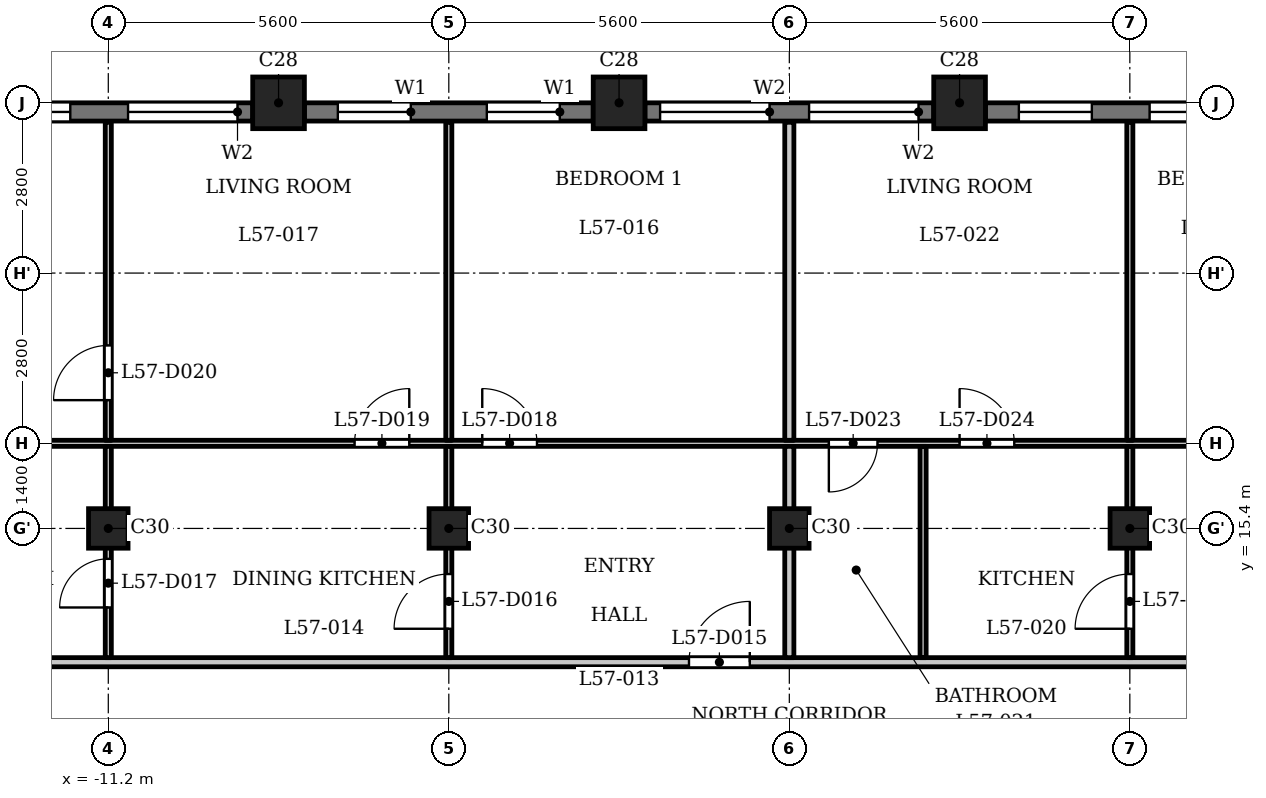
"""IFC4 building model, lengths in metres.
Left out: names, types, materials, properties, quantities, classifications, styles, units other than length and angle.
Written with IfcOpenShell. Run it as: python <this file> out.ifc"""

import sys

from ifc_helpers import new_model, si_unit, direction, frame, frame_2d, origin, origin_2d, place, context, subcontext, project, spatial, rectangle, extrude, element, fill, save


model = new_model("IFC4")
c1 = context("Model", 3, precision=1e-05, world=origin(), true_north=direction((0.0, 1.0)))
c2 = subcontext(c1, "Body", "Model", "MODEL_VIEW")
j1 = project(units=[si_unit("LENGTHUNIT", "METRE"), si_unit("PLANEANGLEUNIT", "RADIAN")], contexts=[c1])
p1 = place(None, origin())
s1 = spatial("IfcSite", under=j1, at=p1, CompositionType="ELEMENT")
p2 = place(p1, origin())
s2 = spatial("IfcBuilding", under=s1, at=p2, CompositionType="ELEMENT")
p3 = place(p2, frame((0.0, 0.0, 220.4)))
s3 = spatial("IfcBuildingStorey", under=s2, at=p3, CompositionType="ELEMENT", Elevation=220.4)
for number, where, z_axis, x_axis in (
    (1, (2.8, 22.4, 0.0), (0.0, 0.0, 1.0), (1.0, 0.0, 0.0)),
    (2, (-2.8, 22.4, 0.0), (0.0, 0.0, 1.0), (1.0, 0.0, 0.0)),
    (3, (-8.4, 22.4, 0.0), (0.0, 0.0, 1.0), (1.0, 0.0, 0.0)),
):
    element("IfcColumn", number, at=place(p3, frame(where, z_axis=z_axis, x_axis=x_axis)), inside=s3, PredefinedType="COLUMN", context=c2, shape_type="SweptSolid", body=[
        extrude(rectangle(XDim=0.85, YDim=0.85, at=origin_2d()), origin(), (0.0, 0.0, 1.0), 3.5),
    ])
for number, where, z_axis, x_axis in (
    (4, (-11.2, 15.4, 0.0), (0.0, 0.0, 1.0), (1.0, 0.0, 0.0)),
    (5, (-5.6, 15.4, 0.0), (0.0, 0.0, 1.0), (1.0, 0.0, 0.0)),
    (6, (0.0, 15.4, 0.0), (0.0, 0.0, 1.0), (1.0, 0.0, 0.0)),
    (7, (5.6, 15.4, 0.0), (0.0, 0.0, 1.0), (1.0, 0.0, 0.0)),
):
    element("IfcColumn", number, at=place(p3, frame(where, z_axis=z_axis, x_axis=x_axis)), inside=s3, PredefinedType="COLUMN", context=c2, shape_type="SweptSolid", body=[
        extrude(rectangle(XDim=0.65, YDim=0.65, at=origin_2d()), origin(), (0.0, 0.0, 1.0), 3.5),
    ])
p4 = place(p3, frame((7.975, 22.25, 0.0), z_axis=(0.0, 0.0, 1.0), x_axis=(-1.0, 0.0, 0.0)))
e8 = element("IfcWall", 8, at=p4, inside=s3, PredefinedType="SOLIDWALL", context=c2, shape_type="SweptSolid", body=[
    extrude(rectangle(XDim=4.75, YDim=0.3, at=frame_2d((2.375, 0.0))), origin(), (0.0, 0.0, 1.0), 2.5),
])
p5 = place(p4, frame((0.25, 0.0, 0.9)))
e9 = element("IfcOpeningElement", 9, at=p5, cuts=e8, PredefinedType="OPENING", context=c2, shape_type="SweptSolid", body=[
    extrude(rectangle(XDim=1.8, YDim=1.25, at=frame_2d((0.9, 0.625))), frame((0.0, 0.16, 0.0), z_axis=(0.0, -1.0, 0.0), x_axis=(1.0, 0.0, 0.0)), (0.0, 0.0, 1.0), 0.32),
])
p6 = place(p4, frame((3.0, 0.0, 0.6)))
e10 = element("IfcOpeningElement", 10, at=p6, cuts=e8, PredefinedType="OPENING", context=c2, shape_type="SweptSolid", body=[
    extrude(rectangle(XDim=1.2, YDim=1.55, at=frame_2d((0.6, 0.775))), frame((0.0, 0.16, 0.0), z_axis=(0.0, -1.0, 0.0), x_axis=(1.0, 0.0, 0.0)), (0.0, 0.0, 1.0), 0.32),
])
p7 = place(p3, frame((2.375, 22.25, 0.0), z_axis=(0.0, 0.0, 1.0), x_axis=(-1.0, 0.0, 0.0)))
e11 = element("IfcWall", 11, at=p7, inside=s3, PredefinedType="SOLIDWALL", context=c2, shape_type="SweptSolid", body=[
    extrude(rectangle(XDim=4.75, YDim=0.3, at=frame_2d((2.375, 0.0))), origin(), (0.0, 0.0, 1.0), 2.5),
])
p8 = place(p7, frame((0.25, 0.0, 0.9)))
e12 = element("IfcOpeningElement", 12, at=p8, cuts=e11, PredefinedType="OPENING", context=c2, shape_type="SweptSolid", body=[
    extrude(rectangle(XDim=1.8, YDim=1.25, at=frame_2d((0.9, 0.625))), frame((0.0, 0.16, 0.0), z_axis=(0.0, -1.0, 0.0), x_axis=(1.0, 0.0, 0.0)), (0.0, 0.0, 1.0), 0.32),
])
p9 = place(p7, frame((2.7, 0.0, 0.9)))
e13 = element("IfcOpeningElement", 13, at=p9, cuts=e11, PredefinedType="OPENING", context=c2, shape_type="SweptSolid", body=[
    extrude(rectangle(XDim=1.8, YDim=1.25, at=frame_2d((0.9, 0.625))), frame((0.0, 0.16, 0.0), z_axis=(0.0, -1.0, 0.0), x_axis=(1.0, 0.0, 0.0)), (0.0, 0.0, 1.0), 0.32),
])
p10 = place(p3, frame((-3.225, 22.25, 0.0), z_axis=(0.0, 0.0, 1.0), x_axis=(-1.0, 0.0, 0.0)))
e14 = element("IfcWall", 14, at=p10, inside=s3, PredefinedType="SOLIDWALL", context=c2, shape_type="SweptSolid", body=[
    extrude(rectangle(XDim=4.75, YDim=0.3, at=frame_2d((2.375, 0.0))), origin(), (0.0, 0.0, 1.0), 2.5),
])
p11 = place(p10, frame((0.55, 0.0, 0.6)))
e15 = element("IfcOpeningElement", 15, at=p11, cuts=e14, PredefinedType="OPENING", context=c2, shape_type="SweptSolid", body=[
    extrude(rectangle(XDim=1.2, YDim=1.55, at=frame_2d((0.6, 0.775))), frame((0.0, 0.16, 0.0), z_axis=(0.0, -1.0, 0.0), x_axis=(1.0, 0.0, 0.0)), (0.0, 0.0, 1.0), 0.32),
])
p12 = place(p10, frame((3.0, 0.0, 0.6)))
e16 = element("IfcOpeningElement", 16, at=p12, cuts=e14, PredefinedType="OPENING", context=c2, shape_type="SweptSolid", body=[
    extrude(rectangle(XDim=1.2, YDim=1.55, at=frame_2d((0.6, 0.775))), frame((0.0, 0.16, 0.0), z_axis=(0.0, -1.0, 0.0), x_axis=(1.0, 0.0, 0.0)), (0.0, 0.0, 1.0), 0.32),
])
p13 = place(p3, frame((-8.825, 22.25, 0.0), z_axis=(0.0, 0.0, 1.0), x_axis=(-1.0, 0.0, 0.0)))
e17 = element("IfcWall", 17, at=p13, inside=s3, PredefinedType="SOLIDWALL", context=c2, shape_type="SweptSolid", body=[
    extrude(rectangle(XDim=4.75, YDim=0.3, at=frame_2d((2.375, 0.0))), origin(), (0.0, 0.0, 1.0), 2.5),
])
p14 = place(p13, frame((0.25, 0.0, 0.9)))
e18 = element("IfcOpeningElement", 18, at=p14, cuts=e17, PredefinedType="OPENING", context=c2, shape_type="SweptSolid", body=[
    extrude(rectangle(XDim=1.8, YDim=1.25, at=frame_2d((0.9, 0.625))), frame((0.0, 0.16, 0.0), z_axis=(0.0, -1.0, 0.0), x_axis=(1.0, 0.0, 0.0)), (0.0, 0.0, 1.0), 0.32),
])
p15 = place(p13, frame((3.0, 0.0, 0.6)))
e19 = element("IfcOpeningElement", 19, at=p15, cuts=e17, PredefinedType="OPENING", context=c2, shape_type="SweptSolid", body=[
    extrude(rectangle(XDim=1.2, YDim=1.55, at=frame_2d((0.6, 0.775))), frame((0.0, 0.16, 0.0), z_axis=(0.0, -1.0, 0.0), x_axis=(1.0, 0.0, 0.0)), (0.0, 0.0, 1.0), 0.32),
])
p16 = place(p3, frame((-17.4, 13.2, 0.0), z_axis=(0.0, 0.0, 1.0), x_axis=(1.0, 0.0, 0.0)))
e20 = element("IfcWall", 20, at=p16, inside=s3, PredefinedType="PARTITIONING", context=c2, shape_type="SweptSolid", body=[
    extrude(rectangle(XDim=34.8, YDim=0.15, at=frame_2d((17.4, 0.0))), origin(), (0.0, 0.0, 1.0), 3.2),
])
p17 = place(p16, frame((0.25, 0.0, 0.0)))
e21 = element("IfcOpeningElement", 21, at=p17, cuts=e20, PredefinedType="OPENING", context=c2, shape_type="SweptSolid", body=[
    extrude(rectangle(XDim=1.0, YDim=2.1, at=frame_2d((0.5, 1.05))), frame((0.0, 0.085, 0.0), z_axis=(0.0, -1.0, 0.0), x_axis=(1.0, 0.0, 0.0)), (0.0, 0.0, 1.0), 0.17),
])
p18 = place(p16, frame((33.65, 0.0, 0.0)))
e22 = element("IfcOpeningElement", 22, at=p18, cuts=e20, PredefinedType="OPENING", context=c2, shape_type="SweptSolid", body=[
    extrude(rectangle(XDim=1.0, YDim=2.1, at=frame_2d((0.5, 1.05))), frame((0.0, 0.085, 0.0), z_axis=(0.0, -1.0, 0.0), x_axis=(1.0, 0.0, 0.0)), (0.0, 0.0, 1.0), 0.17),
])
p19 = place(p16, frame((15.75, 0.0, 0.0)))
e23 = element("IfcOpeningElement", 23, at=p19, cuts=e20, PredefinedType="OPENING", context=c2, shape_type="SweptSolid", body=[
    extrude(rectangle(XDim=1.0, YDim=2.1, at=frame_2d((0.5, 1.05))), frame((0.0, 0.085, 0.0), z_axis=(0.0, -1.0, 0.0), x_axis=(1.0, 0.0, 0.0)), (0.0, 0.0, 1.0), 0.17),
])
p20 = place(p16, frame((26.95, 0.0, 0.0)))
e24 = element("IfcOpeningElement", 24, at=p20, cuts=e20, PredefinedType="OPENING", context=c2, shape_type="SweptSolid", body=[
    extrude(rectangle(XDim=1.0, YDim=2.1, at=frame_2d((0.5, 1.05))), frame((0.0, 0.085, 0.0), z_axis=(0.0, -1.0, 0.0), x_axis=(1.0, 0.0, 0.0)), (0.0, 0.0, 1.0), 0.17),
])
p21 = place(p16, frame((29.75, 0.0, 0.0)))
e25 = element("IfcOpeningElement", 25, at=p21, cuts=e20, PredefinedType="OPENING", context=c2, shape_type="SweptSolid", body=[
    extrude(rectangle(XDim=1.0, YDim=2.1, at=frame_2d((0.5, 1.05))), frame((0.0, 0.085, 0.0), z_axis=(0.0, -1.0, 0.0), x_axis=(1.0, 0.0, 0.0)), (0.0, 0.0, 1.0), 0.17),
])
p22 = place(p3, frame((-16.725, 16.8, 0.0), z_axis=(0.0, 0.0, 1.0), x_axis=(1.0, 0.0, 0.0)))
e26 = element("IfcWall", 26, at=p22, inside=s3, PredefinedType="PARTITIONING", context=c2, shape_type="SweptSolid", body=[
    extrude(rectangle(XDim=33.45, YDim=0.1, at=frame_2d((16.725, 0.0))), origin(), (0.0, 0.0, 1.0), 3.2),
])
p23 = place(p22, frame((11.675, 0.0, 0.0)))
e27 = element("IfcOpeningElement", 27, at=p23, cuts=e26, PredefinedType="OPENING", context=c2, shape_type="SweptSolid", body=[
    extrude(rectangle(XDim=0.9, YDim=2.1, at=frame_2d((0.45, 1.05))), frame((0.0, 0.06, 0.0), z_axis=(0.0, -1.0, 0.0), x_axis=(1.0, 0.0, 0.0)), (0.0, 0.0, 1.0), 0.12),
])
p24 = place(p22, frame((9.575, 0.0, 0.0)))
e28 = element("IfcOpeningElement", 28, at=p24, cuts=e26, PredefinedType="OPENING", context=c2, shape_type="SweptSolid", body=[
    extrude(rectangle(XDim=0.9, YDim=2.1, at=frame_2d((0.45, 1.05))), frame((0.0, 0.06, 0.0), z_axis=(0.0, -1.0, 0.0), x_axis=(1.0, 0.0, 0.0)), (0.0, 0.0, 1.0), 0.12),
])
p25 = place(p22, frame((17.375, 0.0, 0.0)))
e29 = element("IfcOpeningElement", 29, at=p25, cuts=e26, PredefinedType="OPENING", context=c2, shape_type="SweptSolid", body=[
    extrude(rectangle(XDim=0.8, YDim=2.1, at=frame_2d((0.4, 1.05))), frame((0.0, 0.06, 0.0), z_axis=(0.0, -1.0, 0.0), x_axis=(1.0, 0.0, 0.0)), (0.0, 0.0, 1.0), 0.12),
])
p26 = place(p22, frame((19.525, 0.0, 0.0)))
e30 = element("IfcOpeningElement", 30, at=p26, cuts=e26, PredefinedType="OPENING", context=c2, shape_type="SweptSolid", body=[
    extrude(rectangle(XDim=0.9, YDim=2.1, at=frame_2d((0.45, 1.05))), frame((0.0, 0.06, 0.0), z_axis=(0.0, -1.0, 0.0), x_axis=(1.0, 0.0, 0.0)), (0.0, 0.0, 1.0), 0.12),
])
p27 = place(p22, frame((23.775, 0.0, 0.0)))
e31 = element("IfcOpeningElement", 31, at=p27, cuts=e26, PredefinedType="OPENING", context=c2, shape_type="SweptSolid", body=[
    extrude(rectangle(XDim=0.9, YDim=2.1, at=frame_2d((0.45, 1.05))), frame((0.0, 0.06, 0.0), z_axis=(0.0, -1.0, 0.0), x_axis=(1.0, 0.0, 0.0)), (0.0, 0.0, 1.0), 0.12),
])
p28 = place(p22, frame((26.125, 0.0, 0.0)))
e32 = element("IfcOpeningElement", 32, at=p28, cuts=e26, PredefinedType="OPENING", context=c2, shape_type="SweptSolid", body=[
    extrude(rectangle(XDim=0.9, YDim=2.1, at=frame_2d((0.45, 1.05))), frame((0.0, 0.06, 0.0), z_axis=(0.0, -1.0, 0.0), x_axis=(1.0, 0.0, 0.0)), (0.0, 0.0, 1.0), 0.12),
])
p29 = place(p22, frame((32.075, 0.0, 0.0)))
e33 = element("IfcOpeningElement", 33, at=p29, cuts=e26, PredefinedType="OPENING", context=c2, shape_type="SweptSolid", body=[
    extrude(rectangle(XDim=0.8, YDim=2.1, at=frame_2d((0.4, 1.05))), frame((0.0, 0.06, 0.0), z_axis=(0.0, -1.0, 0.0), x_axis=(1.0, 0.0, 0.0)), (0.0, 0.0, 1.0), 0.12),
])
p30 = place(p22, frame((29.175, 0.0, 0.0)))
e34 = element("IfcOpeningElement", 34, at=p30, cuts=e26, PredefinedType="OPENING", context=c2, shape_type="SweptSolid", body=[
    extrude(rectangle(XDim=0.9, YDim=2.1, at=frame_2d((0.45, 1.05))), frame((0.0, 0.06, 0.0), z_axis=(0.0, -1.0, 0.0), x_axis=(1.0, 0.0, 0.0)), (0.0, 0.0, 1.0), 0.12),
])
p31 = place(p3, frame((-11.2, 13.275, 0.0), z_axis=(0.0, 0.0, 1.0), x_axis=(0.0, 1.0, 0.0)))
e35 = element("IfcWall", 35, at=p31, inside=s3, PredefinedType="PARTITIONING", context=c2, shape_type="SweptSolid", body=[
    extrude(rectangle(XDim=3.475, YDim=0.1, at=frame_2d((1.738, 0.0))), origin(), (0.0, 0.0, 1.0), 3.2),
])
p32 = place(p31, frame((0.825, 0.0, 0.0)))
e36 = element("IfcOpeningElement", 36, at=p32, cuts=e35, PredefinedType="OPENING", context=c2, shape_type="SweptSolid", body=[
    extrude(rectangle(XDim=0.8, YDim=2.1, at=frame_2d((0.4, 1.05))), frame((0.0, 0.06, 0.0), z_axis=(0.0, -1.0, 0.0), x_axis=(1.0, 0.0, 0.0)), (0.0, 0.0, 1.0), 0.12),
])
p33 = place(p3, frame((-11.2, 16.85, 0.0), z_axis=(0.0, 0.0, 1.0), x_axis=(0.0, 1.0, 0.0)))
e37 = element("IfcWall", 37, at=p33, inside=s3, PredefinedType="PARTITIONING", context=c2, shape_type="SweptSolid", body=[
    extrude(rectangle(XDim=5.23, YDim=0.1, at=frame_2d((2.615, 0.0))), origin(), (0.0, 0.0, 1.0), 3.2),
])
p34 = place(p33, frame((0.66, 0.0, 0.0)))
e38 = element("IfcOpeningElement", 38, at=p34, cuts=e37, PredefinedType="OPENING", context=c2, shape_type="SweptSolid", body=[
    extrude(rectangle(XDim=0.9, YDim=2.1, at=frame_2d((0.45, 1.05))), frame((0.0, 0.06, 0.0), z_axis=(0.0, -1.0, 0.0), x_axis=(1.0, 0.0, 0.0)), (0.0, 0.0, 1.0), 0.12),
])
p35 = place(p3, frame((-5.6, 13.275, 0.0), z_axis=(0.0, 0.0, 1.0), x_axis=(0.0, 1.0, 0.0)))
e39 = element("IfcWall", 39, at=p35, inside=s3, PredefinedType="PARTITIONING", context=c2, shape_type="SweptSolid", body=[
    extrude(rectangle(XDim=3.475, YDim=0.1, at=frame_2d((1.738, 0.0))), origin(), (0.0, 0.0, 1.0), 3.2),
])
p36 = place(p35, frame((0.475, 0.0, 0.0)))
e40 = element("IfcOpeningElement", 40, at=p36, cuts=e39, PredefinedType="OPENING", context=c2, shape_type="SweptSolid", body=[
    extrude(rectangle(XDim=0.9, YDim=2.1, at=frame_2d((0.45, 1.05))), frame((0.0, 0.06, 0.0), z_axis=(0.0, -1.0, 0.0), x_axis=(1.0, 0.0, 0.0)), (0.0, 0.0, 1.0), 0.12),
])
p37 = place(p3, frame((-5.6, 16.85, 0.0), z_axis=(0.0, 0.0, 1.0), x_axis=(0.0, 1.0, 0.0)))
e41 = element("IfcWall", 41, at=p37, inside=s3, PredefinedType="PARTITIONING", context=c2, shape_type="SweptSolid", body=[
    extrude(rectangle(XDim=5.23, YDim=0.1, at=frame_2d((2.615, 0.0))), origin(), (0.0, 0.0, 1.0), 3.2),
])
p38 = place(p3, frame((0.0, 13.275, 0.0), z_axis=(0.0, 0.0, 1.0), x_axis=(0.0, 1.0, 0.0)))
e42 = element("IfcWall", 42, at=p38, inside=s3, PredefinedType="PARTITIONING", context=c2, shape_type="SweptSolid", body=[
    extrude(rectangle(XDim=3.475, YDim=0.15, at=frame_2d((1.738, 0.0))), origin(), (0.0, 0.0, 1.0), 3.2),
])
p39 = place(p3, frame((0.0, 16.85, 0.0), z_axis=(0.0, 0.0, 1.0), x_axis=(0.0, 1.0, 0.0)))
e43 = element("IfcWall", 43, at=p39, inside=s3, PredefinedType="PARTITIONING", context=c2, shape_type="SweptSolid", body=[
    extrude(rectangle(XDim=5.23, YDim=0.15, at=frame_2d((2.615, 0.0))), origin(), (0.0, 0.0, 1.0), 3.2),
])
p40 = place(p3, frame((2.2, 13.275, 0.0), z_axis=(0.0, 0.0, 1.0), x_axis=(0.0, 1.0, 0.0)))
e44 = element("IfcWall", 44, at=p40, inside=s3, PredefinedType="PARTITIONING", context=c2, shape_type="SweptSolid", body=[
    extrude(rectangle(XDim=3.475, YDim=0.1, at=frame_2d((1.738, 0.0))), origin(), (0.0, 0.0, 1.0), 3.2),
])
p41 = place(p3, frame((5.6, 13.275, 0.0), z_axis=(0.0, 0.0, 1.0), x_axis=(0.0, 1.0, 0.0)))
e45 = element("IfcWall", 45, at=p41, inside=s3, PredefinedType="PARTITIONING", context=c2, shape_type="SweptSolid", body=[
    extrude(rectangle(XDim=3.475, YDim=0.1, at=frame_2d((1.738, 0.0))), origin(), (0.0, 0.0, 1.0), 3.2),
])
p42 = place(p41, frame((0.475, 0.0, 0.0)))
e46 = element("IfcOpeningElement", 46, at=p42, cuts=e45, PredefinedType="OPENING", context=c2, shape_type="SweptSolid", body=[
    extrude(rectangle(XDim=0.9, YDim=2.1, at=frame_2d((0.45, 1.05))), frame((0.0, 0.06, 0.0), z_axis=(0.0, -1.0, 0.0), x_axis=(1.0, 0.0, 0.0)), (0.0, 0.0, 1.0), 0.12),
])
p43 = place(p3, frame((5.6, 16.85, 0.0), z_axis=(0.0, 0.0, 1.0), x_axis=(0.0, 1.0, 0.0)))
e47 = element("IfcWall", 47, at=p43, inside=s3, PredefinedType="PARTITIONING", context=c2, shape_type="SweptSolid", body=[
    extrude(rectangle(XDim=5.23, YDim=0.1, at=frame_2d((2.615, 0.0))), origin(), (0.0, 0.0, 1.0), 3.2),
])
p44 = place(p19, origin())
e48 = element("IfcDoor", 48, at=p44, inside=s3, OperationType="SINGLE_SWING_LEFT", PredefinedType="DOOR", context=c2, shape_type="SweptSolid", body=[
    extrude(rectangle(XDim=1.0, YDim=2.1, at=frame_2d((0.5, 1.05))), frame((0.0, 0.025, 0.0), z_axis=(0.0, -1.0, 0.0), x_axis=(1.0, 0.0, 0.0)), (0.0, 0.0, 1.0), 0.05),
])
fill(e23, e48)
p45 = place(p36, origin())
e49 = element("IfcDoor", 49, at=p45, inside=s3, OperationType="SINGLE_SWING_RIGHT", PredefinedType="DOOR", context=c2, shape_type="SweptSolid", body=[
    extrude(rectangle(XDim=0.9, YDim=2.1, at=frame_2d((0.45, 1.05))), frame((0.0, 0.025, 0.0), z_axis=(0.0, -1.0, 0.0), x_axis=(1.0, 0.0, 0.0)), (0.0, 0.0, 1.0), 0.05),
])
fill(e40, e49)
p46 = place(p32, origin())
e50 = element("IfcDoor", 50, at=p46, inside=s3, OperationType="SINGLE_SWING_RIGHT", PredefinedType="DOOR", context=c2, shape_type="SweptSolid", body=[
    extrude(rectangle(XDim=0.8, YDim=2.1, at=frame_2d((0.4, 1.05))), frame((0.0, 0.025, 0.0), z_axis=(0.0, -1.0, 0.0), x_axis=(1.0, 0.0, 0.0)), (0.0, 0.0, 1.0), 0.05),
])
fill(e36, e50)
p47 = place(p23, origin())
e51 = element("IfcDoor", 51, at=p47, inside=s3, OperationType="SINGLE_SWING_RIGHT", PredefinedType="DOOR", context=c2, shape_type="SweptSolid", body=[
    extrude(rectangle(XDim=0.9, YDim=2.1, at=frame_2d((0.45, 1.05))), frame((0.0, 0.025, 0.0), z_axis=(0.0, -1.0, 0.0), x_axis=(1.0, 0.0, 0.0)), (0.0, 0.0, 1.0), 0.05),
])
fill(e27, e51)
p48 = place(p24, origin())
e52 = element("IfcDoor", 52, at=p48, inside=s3, OperationType="SINGLE_SWING_LEFT", PredefinedType="DOOR", context=c2, shape_type="SweptSolid", body=[
    extrude(rectangle(XDim=0.9, YDim=2.1, at=frame_2d((0.45, 1.05))), frame((0.0, 0.025, 0.0), z_axis=(0.0, -1.0, 0.0), x_axis=(1.0, 0.0, 0.0)), (0.0, 0.0, 1.0), 0.05),
])
fill(e28, e52)
p49 = place(p34, origin())
e53 = element("IfcDoor", 53, at=p49, inside=s3, OperationType="SINGLE_SWING_RIGHT", PredefinedType="DOOR", context=c2, shape_type="SweptSolid", body=[
    extrude(rectangle(XDim=0.9, YDim=2.1, at=frame_2d((0.45, 1.05))), frame((0.0, 0.025, 0.0), z_axis=(0.0, -1.0, 0.0), x_axis=(1.0, 0.0, 0.0)), (0.0, 0.0, 1.0), 0.05),
])
fill(e38, e53)
p50 = place(p42, origin())
e54 = element("IfcDoor", 54, at=p50, inside=s3, OperationType="SINGLE_SWING_RIGHT", PredefinedType="DOOR", context=c2, shape_type="SweptSolid", body=[
    extrude(rectangle(XDim=0.9, YDim=2.1, at=frame_2d((0.45, 1.05))), frame((0.0, 0.025, 0.0), z_axis=(0.0, -1.0, 0.0), x_axis=(1.0, 0.0, 0.0)), (0.0, 0.0, 1.0), 0.05),
])
fill(e46, e54)
p51 = place(p25, origin())
e55 = element("IfcDoor", 55, at=p51, inside=s3, OperationType="SINGLE_SWING_LEFT", PredefinedType="DOOR", context=c2, shape_type="SweptSolid", body=[
    extrude(rectangle(XDim=0.8, YDim=2.1, at=frame_2d((0.4, 1.05))), frame((0.0, 0.025, 0.0), z_axis=(0.0, -1.0, 0.0), x_axis=(1.0, 0.0, 0.0)), (0.0, 0.0, 1.0), 0.05),
])
fill(e29, e55)
p52 = place(p26, origin())
e56 = element("IfcDoor", 56, at=p52, inside=s3, OperationType="SINGLE_SWING_RIGHT", PredefinedType="DOOR", context=c2, shape_type="SweptSolid", body=[
    extrude(rectangle(XDim=0.9, YDim=2.1, at=frame_2d((0.45, 1.05))), frame((0.0, 0.025, 0.0), z_axis=(0.0, -1.0, 0.0), x_axis=(1.0, 0.0, 0.0)), (0.0, 0.0, 1.0), 0.05),
])
fill(e30, e56)
p53 = place(p5, origin())
e57 = element("IfcWindow", 57, at=p53, inside=s3, PartitioningType="SINGLE_PANEL", PredefinedType="WINDOW", context=c2, shape_type="SweptSolid", body=[
    extrude(rectangle(XDim=1.8, YDim=1.25, at=frame_2d((0.9, 0.625))), frame((0.0, 0.03, 0.0), z_axis=(0.0, -1.0, 0.0), x_axis=(1.0, 0.0, 0.0)), (0.0, 0.0, 1.0), 0.06),
])
fill(e9, e57)
p54 = place(p6, origin())
e58 = element("IfcWindow", 58, at=p54, inside=s3, PartitioningType="SINGLE_PANEL", PredefinedType="WINDOW", context=c2, shape_type="SweptSolid", body=[
    extrude(rectangle(XDim=1.2, YDim=1.55, at=frame_2d((0.6, 0.775))), frame((0.0, 0.03, 0.0), z_axis=(0.0, -1.0, 0.0), x_axis=(1.0, 0.0, 0.0)), (0.0, 0.0, 1.0), 0.06),
])
fill(e10, e58)
p55 = place(p8, origin())
e59 = element("IfcWindow", 59, at=p55, inside=s3, PartitioningType="SINGLE_PANEL", PredefinedType="WINDOW", context=c2, shape_type="SweptSolid", body=[
    extrude(rectangle(XDim=1.8, YDim=1.25, at=frame_2d((0.9, 0.625))), frame((0.0, 0.03, 0.0), z_axis=(0.0, -1.0, 0.0), x_axis=(1.0, 0.0, 0.0)), (0.0, 0.0, 1.0), 0.06),
])
fill(e12, e59)
p56 = place(p9, origin())
e60 = element("IfcWindow", 60, at=p56, inside=s3, PartitioningType="SINGLE_PANEL", PredefinedType="WINDOW", context=c2, shape_type="SweptSolid", body=[
    extrude(rectangle(XDim=1.8, YDim=1.25, at=frame_2d((0.9, 0.625))), frame((0.0, 0.03, 0.0), z_axis=(0.0, -1.0, 0.0), x_axis=(1.0, 0.0, 0.0)), (0.0, 0.0, 1.0), 0.06),
])
fill(e13, e60)
p57 = place(p11, origin())
e61 = element("IfcWindow", 61, at=p57, inside=s3, PartitioningType="SINGLE_PANEL", PredefinedType="WINDOW", context=c2, shape_type="SweptSolid", body=[
    extrude(rectangle(XDim=1.2, YDim=1.55, at=frame_2d((0.6, 0.775))), frame((0.0, 0.03, 0.0), z_axis=(0.0, -1.0, 0.0), x_axis=(1.0, 0.0, 0.0)), (0.0, 0.0, 1.0), 0.06),
])
fill(e15, e61)
p58 = place(p12, origin())
e62 = element("IfcWindow", 62, at=p58, inside=s3, PartitioningType="SINGLE_PANEL", PredefinedType="WINDOW", context=c2, shape_type="SweptSolid", body=[
    extrude(rectangle(XDim=1.2, YDim=1.55, at=frame_2d((0.6, 0.775))), frame((0.0, 0.03, 0.0), z_axis=(0.0, -1.0, 0.0), x_axis=(1.0, 0.0, 0.0)), (0.0, 0.0, 1.0), 0.06),
])
fill(e16, e62)
p59 = place(p14, origin())
e63 = element("IfcWindow", 63, at=p59, inside=s3, PartitioningType="SINGLE_PANEL", PredefinedType="WINDOW", context=c2, shape_type="SweptSolid", body=[
    extrude(rectangle(XDim=1.8, YDim=1.25, at=frame_2d((0.9, 0.625))), frame((0.0, 0.03, 0.0), z_axis=(0.0, -1.0, 0.0), x_axis=(1.0, 0.0, 0.0)), (0.0, 0.0, 1.0), 0.06),
])
fill(e18, e63)
p60 = place(p15, origin())
e64 = element("IfcWindow", 64, at=p60, inside=s3, PartitioningType="SINGLE_PANEL", PredefinedType="WINDOW", context=c2, shape_type="SweptSolid", body=[
    extrude(rectangle(XDim=1.2, YDim=1.55, at=frame_2d((0.6, 0.775))), frame((0.0, 0.03, 0.0), z_axis=(0.0, -1.0, 0.0), x_axis=(1.0, 0.0, 0.0)), (0.0, 0.0, 1.0), 0.06),
])
fill(e19, e64)
save(model, sys.argv[1])
